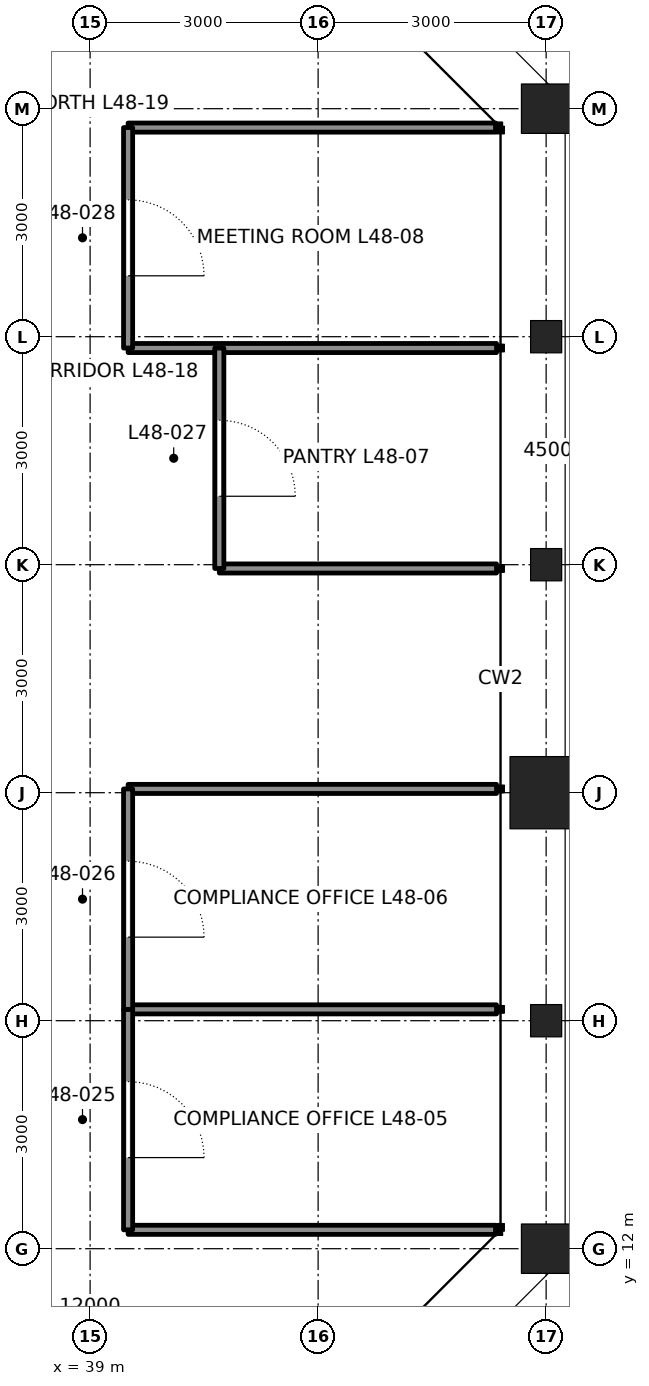
"""IFC4 building model, lengths in metres.
Left out: names, types, materials, properties, quantities, classifications, styles, units other than length and angle.
Written with IfcOpenShell. Run it as: python <this file> out.ifc"""

import sys

from ifc_helpers import new_model, si_unit, direction, frame, frame_2d, origin, origin_2d, place, context, subcontext, project, spatial, rectangle, hollow_rectangle, i_section, extrude, element, fill, save


model = new_model("IFC4")
c1 = context("Model", 3, precision=1e-05, world=origin(), true_north=direction((0.0, 1.0)))
c2 = subcontext(c1, "Body", "Model", "MODEL_VIEW")
j1 = project(units=[si_unit("LENGTHUNIT", "METRE"), si_unit("PLANEANGLEUNIT", "RADIAN")], contexts=[c1])
p1 = place(None, origin())
s1 = spatial("IfcSite", under=j1, at=p1, CompositionType="ELEMENT")
p2 = place(p1, origin())
s2 = spatial("IfcBuilding", under=s1, at=p2, CompositionType="ELEMENT")
p3 = place(p2, frame((0.0, 0.0, 218.1)))
s3 = spatial("IfcBuildingStorey", under=s2, at=p3, CompositionType="ELEMENT", Elevation=218.1)
p4 = place(p3, frame((45.0, 12.0, 0.0), z_axis=(0.0, 0.0, 1.0), x_axis=(1.0, 0.0, 0.0)))
e1 = element("IfcColumn", 1, at=p4, inside=s3, PredefinedType="COLUMN", context=c2, shape_type="SweptSolid", body=[
    extrude(hollow_rectangle(XDim=0.65, YDim=0.65, WallThickness=0.065, at=origin_2d()), origin(), (0.0, 0.0, 1.0), 4.2),
])
p5 = place(p3, frame((45.0, 15.0, 0.0), z_axis=(0.0, 0.0, 1.0), x_axis=(1.0, 0.0, 0.0)))
e2 = element("IfcColumn", 2, at=p5, inside=s3, PredefinedType="COLUMN", context=c2, shape_type="SweptSolid", body=[
    extrude(i_section(OverallWidth=0.409, OverallDepth=0.424, WebThickness=0.033, FlangeThickness=0.052, at=origin_2d()), origin(), (0.0, 0.0, 1.0), 4.2),
])
p6 = place(p3, frame((45.0, 18.0, 0.0), z_axis=(0.0, 0.0, 1.0), x_axis=(1.0, 0.0, 0.0)))
e3 = element("IfcColumn", 3, at=p6, inside=s3, PredefinedType="COLUMN", context=c2, shape_type="SweptSolid", body=[
    extrude(hollow_rectangle(XDim=0.95, YDim=0.95, WallThickness=0.11, at=origin_2d()), origin(), (0.0, 0.0, 1.0), 4.2),
])
for number, where, z_axis, x_axis in (
    (4, (45.0, 21.0, 0.0), (0.0, 0.0, 1.0), (1.0, 0.0, 0.0)),
    (5, (45.0, 24.0, 0.0), (0.0, 0.0, 1.0), (1.0, 0.0, 0.0)),
):
    element("IfcColumn", number, at=place(p3, frame(where, z_axis=z_axis, x_axis=x_axis)), inside=s3, PredefinedType="COLUMN", context=c2, shape_type="SweptSolid", body=[
        extrude(i_section(OverallWidth=0.409, OverallDepth=0.424, WebThickness=0.033, FlangeThickness=0.052, at=origin_2d()), origin(), (0.0, 0.0, 1.0), 4.2),
    ])
p7 = place(p3, frame((45.0, 27.0, 0.0), z_axis=(0.0, 0.0, 1.0), x_axis=(1.0, 0.0, 0.0)))
e6 = element("IfcColumn", 6, at=p7, inside=s3, PredefinedType="COLUMN", context=c2, shape_type="SweptSolid", body=[
    extrude(hollow_rectangle(XDim=0.65, YDim=0.65, WallThickness=0.065, at=origin_2d()), origin(), (0.0, 0.0, 1.0), 4.2),
])
p8 = place(p3, frame((44.334, 12.249, 0.0), z_axis=(0.0, 0.0, 1.0), x_axis=(-1.0, 0.0, 0.0)))
e7 = element("IfcWall", 7, at=p8, inside=s3, PredefinedType="PARTITIONING", context=c2, shape_type="SweptSolid", body=[
    extrude(rectangle(XDim=4.834, YDim=0.12, at=frame_2d((2.417, 0.0))), origin(), (0.0, 0.0, 1.0), 4.04),
])
p9 = place(p3, frame((44.347, 15.149, 0.0), z_axis=(0.0, 0.0, 1.0), x_axis=(-1.0, 0.0, 0.0)))
e8 = element("IfcWall", 8, at=p9, inside=s3, PredefinedType="PARTITIONING", context=c2, shape_type="SweptSolid", body=[
    extrude(rectangle(XDim=4.847, YDim=0.12, at=frame_2d((2.424, 0.0))), origin(), (0.0, 0.0, 1.0), 4.04),
])
p10 = place(p3, frame((44.347, 18.05, 0.0), z_axis=(0.0, 0.0, 1.0), x_axis=(-1.0, 0.0, 0.0)))
e9 = element("IfcWall", 9, at=p10, inside=s3, PredefinedType="PARTITIONING", context=c2, shape_type="SweptSolid", body=[
    extrude(rectangle(XDim=4.847, YDim=0.12, at=frame_2d((2.424, 0.0))), origin(), (0.0, 0.0, 1.0), 3.357),
])
p11 = place(p3, frame((44.347, 20.95, 0.0), z_axis=(0.0, 0.0, 1.0), x_axis=(-1.0, 0.0, 0.0)))
e10 = element("IfcWall", 10, at=p11, inside=s3, PredefinedType="PARTITIONING", context=c2, shape_type="SweptSolid", body=[
    extrude(rectangle(XDim=3.647, YDim=0.12, at=frame_2d((1.824, 0.0))), origin(), (0.0, 0.0, 1.0), 3.357),
])
p12 = place(p3, frame((44.347, 23.851, 0.0), z_axis=(0.0, 0.0, 1.0), x_axis=(-1.0, 0.0, 0.0)))
e11 = element("IfcWall", 11, at=p12, inside=s3, PredefinedType="PARTITIONING", context=c2, shape_type="SweptSolid", body=[
    extrude(rectangle(XDim=4.847, YDim=0.12, at=frame_2d((2.424, 0.0))), origin(), (0.0, 0.0, 1.0), 4.04),
])
p13 = place(p3, frame((44.334, 26.751, 0.0), z_axis=(0.0, 0.0, 1.0), x_axis=(-1.0, 0.0, 0.0)))
e12 = element("IfcWall", 12, at=p13, inside=s3, PredefinedType="PARTITIONING", context=c2, shape_type="SweptSolid", body=[
    extrude(rectangle(XDim=4.834, YDim=0.12, at=frame_2d((2.417, 0.0))), origin(), (0.0, 0.0, 1.0), 4.04),
])
p14 = place(p3, frame((39.5, 12.249, 0.0), z_axis=(0.0, 0.0, 1.0), x_axis=(0.0, 1.0, 0.0)))
e13 = element("IfcWall", 13, at=p14, inside=s3, PredefinedType="PARTITIONING", context=c2, shape_type="SweptSolid", body=[
    extrude(rectangle(XDim=2.901, YDim=0.12, at=frame_2d((1.45, 0.0))), origin(), (0.0, 0.0, 1.0), 4.04),
])
p15 = place(p14, frame((0.95, 0.0, 0.0)))
e14 = element("IfcOpeningElement", 14, at=p15, cuts=e13, PredefinedType="OPENING", context=c2, shape_type="SweptSolid", body=[
    extrude(rectangle(XDim=1.0, YDim=2.4, at=frame_2d((0.5, 1.2))), frame((0.0, 0.07, 0.0), z_axis=(0.0, -1.0, 0.0), x_axis=(1.0, 0.0, 0.0)), (0.0, 0.0, 1.0), 0.14),
])
p16 = place(p3, frame((39.5, 15.149, 0.0), z_axis=(0.0, 0.0, 1.0), x_axis=(0.0, 1.0, 0.0)))
e15 = element("IfcWall", 15, at=p16, inside=s3, PredefinedType="PARTITIONING", context=c2, shape_type="SweptSolid", body=[
    extrude(rectangle(XDim=2.901, YDim=0.12, at=frame_2d((1.45, 0.0))), origin(), (0.0, 0.0, 1.0), 4.04),
])
p17 = place(p16, frame((0.95, 0.0, 0.0)))
e16 = element("IfcOpeningElement", 16, at=p17, cuts=e15, PredefinedType="OPENING", context=c2, shape_type="SweptSolid", body=[
    extrude(rectangle(XDim=1.0, YDim=2.4, at=frame_2d((0.5, 1.2))), frame((0.0, 0.07, 0.0), z_axis=(0.0, -1.0, 0.0), x_axis=(1.0, 0.0, 0.0)), (0.0, 0.0, 1.0), 0.14),
])
p18 = place(p3, frame((40.7, 20.95, 0.0), z_axis=(0.0, 0.0, 1.0), x_axis=(0.0, 1.0, 0.0)))
e17 = element("IfcWall", 17, at=p18, inside=s3, PredefinedType="PARTITIONING", context=c2, shape_type="SweptSolid", body=[
    extrude(rectangle(XDim=2.901, YDim=0.12, at=frame_2d((1.45, 0.0))), origin(), (0.0, 0.0, 1.0), 4.04),
])
p19 = place(p18, frame((0.95, 0.0, 0.0)))
e18 = element("IfcOpeningElement", 18, at=p19, cuts=e17, PredefinedType="OPENING", context=c2, shape_type="SweptSolid", body=[
    extrude(rectangle(XDim=1.0, YDim=2.4, at=frame_2d((0.5, 1.2))), frame((0.0, 0.07, 0.0), z_axis=(0.0, -1.0, 0.0), x_axis=(1.0, 0.0, 0.0)), (0.0, 0.0, 1.0), 0.14),
])
p20 = place(p3, frame((39.5, 23.851, 0.0), z_axis=(0.0, 0.0, 1.0), x_axis=(0.0, 1.0, 0.0)))
e19 = element("IfcWall", 19, at=p20, inside=s3, PredefinedType="PARTITIONING", context=c2, shape_type="SweptSolid", body=[
    extrude(rectangle(XDim=2.901, YDim=0.12, at=frame_2d((1.45, 0.0))), origin(), (0.0, 0.0, 1.0), 4.04),
])
p21 = place(p20, frame((0.95, 0.0, 0.0)))
e20 = element("IfcOpeningElement", 20, at=p21, cuts=e19, PredefinedType="OPENING", context=c2, shape_type="SweptSolid", body=[
    extrude(rectangle(XDim=1.0, YDim=2.4, at=frame_2d((0.5, 1.2))), frame((0.0, 0.07, 0.0), z_axis=(0.0, -1.0, 0.0), x_axis=(1.0, 0.0, 0.0)), (0.0, 0.0, 1.0), 0.14),
])
p22 = place(p3, frame((36.0, 12.0, 0.0), z_axis=(0.0, 0.0, 1.0), x_axis=(0.707106781187, -0.707106781187, 0.0)))
e21 = element("IfcWall", 21, at=p22, inside=s3, PredefinedType="PARTITIONING", context=c2, shape_type="SweptSolid", body=[
    extrude(rectangle(XDim=5.732, YDim=0.12, at=frame_2d((2.866, 0.0))), origin(), (0.0, 0.0, 1.0), 4.04),
])
p23 = place(p22, frame((1.3, 0.0, 0.0)))
e22 = element("IfcOpeningElement", 22, at=p23, cuts=e21, PredefinedType="OPENING", context=c2, shape_type="SweptSolid", body=[
    extrude(rectangle(XDim=1.0, YDim=2.4, at=frame_2d((0.5, 1.2))), frame((0.0, 0.07, 0.0), z_axis=(0.0, -1.0, 0.0), x_axis=(1.0, 0.0, 0.0)), (0.0, 0.0, 1.0), 0.14),
])
p24 = place(p15, frame((1.0, 0.0, 0.0), z_axis=(0.0, 0.0, 1.0), x_axis=(-1.0, 0.0, 0.0)))
e23 = element("IfcDoor", 23, at=p24, inside=s3, OperationType="SINGLE_SWING_RIGHT", PredefinedType="DOOR", context=c2, shape_type="SweptSolid", body=[
    extrude(rectangle(XDim=1.0, YDim=2.4, at=frame_2d((0.5, 1.2))), frame((0.0, 0.025, 0.0), z_axis=(0.0, -1.0, 0.0), x_axis=(1.0, 0.0, 0.0)), (0.0, 0.0, 1.0), 0.05),
])
fill(e14, e23)
p25 = place(p17, frame((1.0, 0.0, 0.0), z_axis=(0.0, 0.0, 1.0), x_axis=(-1.0, 0.0, 0.0)))
e24 = element("IfcDoor", 24, at=p25, inside=s3, OperationType="SINGLE_SWING_RIGHT", PredefinedType="DOOR", context=c2, shape_type="SweptSolid", body=[
    extrude(rectangle(XDim=1.0, YDim=2.4, at=frame_2d((0.5, 1.2))), frame((0.0, 0.025, 0.0), z_axis=(0.0, -1.0, 0.0), x_axis=(1.0, 0.0, 0.0)), (0.0, 0.0, 1.0), 0.05),
])
fill(e16, e24)
p26 = place(p19, frame((1.0, 0.0, 0.0), z_axis=(0.0, 0.0, 1.0), x_axis=(-1.0, 0.0, 0.0)))
e25 = element("IfcDoor", 25, at=p26, inside=s3, OperationType="SINGLE_SWING_RIGHT", PredefinedType="DOOR", context=c2, shape_type="SweptSolid", body=[
    extrude(rectangle(XDim=1.0, YDim=2.4, at=frame_2d((0.5, 1.2))), frame((0.0, 0.025, 0.0), z_axis=(0.0, -1.0, 0.0), x_axis=(1.0, 0.0, 0.0)), (0.0, 0.0, 1.0), 0.05),
])
fill(e18, e25)
p27 = place(p21, frame((1.0, 0.0, 0.0), z_axis=(0.0, 0.0, 1.0), x_axis=(-1.0, 0.0, 0.0)))
e26 = element("IfcDoor", 26, at=p27, inside=s3, OperationType="SINGLE_SWING_RIGHT", PredefinedType="DOOR", context=c2, shape_type="SweptSolid", body=[
    extrude(rectangle(XDim=1.0, YDim=2.4, at=frame_2d((0.5, 1.2))), frame((0.0, 0.025, 0.0), z_axis=(0.0, -1.0, 0.0), x_axis=(1.0, 0.0, 0.0)), (0.0, 0.0, 1.0), 0.05),
])
fill(e20, e26)
save(model, sys.argv[1])
